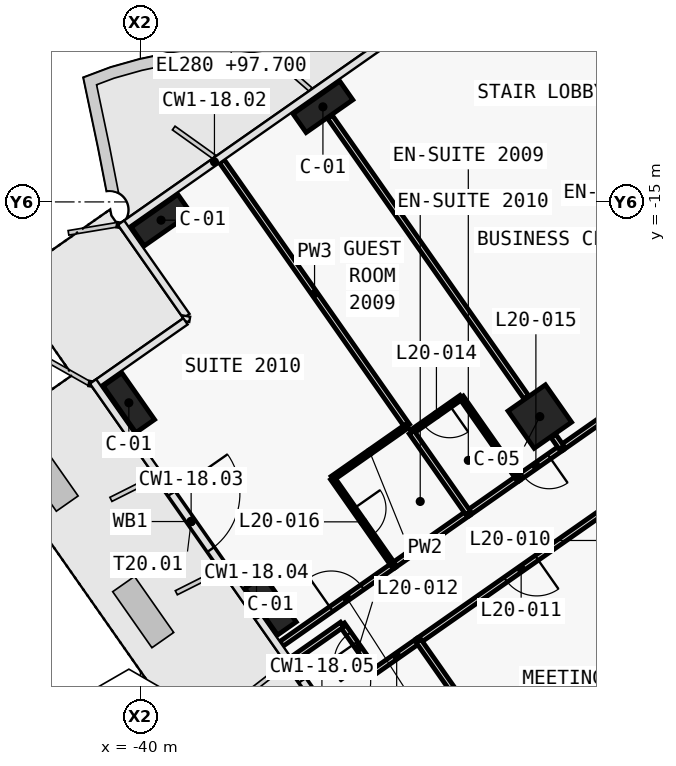
"""IFC4 building model, lengths in metres.
Left out: names, types, materials, properties, quantities, classifications, styles, units other than length and angle.
Written with IfcOpenShell. Run it as: python <this file> out.ifc"""

import sys

from ifc_helpers import new_model, si_unit, direction, frame, frame_2d, origin, origin_2d, place, context, subcontext, project, spatial, rectangle, extrude, element, fill, save


model = new_model("IFC4")
c1 = context("Model", 3, precision=1e-05, world=origin(), true_north=direction((0.0, 1.0)))
c2 = subcontext(c1, "Body", "Model", "MODEL_VIEW")
j1 = project(units=[si_unit("LENGTHUNIT", "METRE"), si_unit("PLANEANGLEUNIT", "RADIAN")], contexts=[c1])
p1 = place(None, origin())
s1 = spatial("IfcSite", under=j1, at=p1, CompositionType="ELEMENT")
p2 = place(p1, origin())
s2 = spatial("IfcBuilding", under=s1, at=p2, CompositionType="ELEMENT")
p3 = place(p2, frame((0.0, 0.0, 97.7)))
s3 = spatial("IfcBuildingStorey", under=s2, at=p3, CompositionType="ELEMENT", Elevation=97.7)
for number, where, z_axis, x_axis in (
    (1, (-35.197, -12.498, 0.0), (0.0, 0.0, 1.0), (-0.819, -0.574, 0.0)),
    (2, (-39.456, -15.481, 0.0), (0.0, 0.0, 1.0), (-0.819, -0.574, 0.0)),
    (3, (-36.575, -25.61, 0.0), (0.0, 0.0, 1.0), (-0.574, 0.819, 0.0)),
    (4, (-40.303, -20.286, 0.0), (0.0, 0.0, 1.0), (-0.574, 0.819, 0.0)),
):
    element("IfcColumn", number, at=place(p3, frame(where, z_axis=z_axis, x_axis=x_axis)), inside=s3, PredefinedType="COLUMN", context=c2, shape_type="SweptSolid", body=[
        extrude(rectangle(XDim=1.5, YDim=0.6, at=origin_2d()), origin(), (0.0, 0.0, 1.0), 3.6),
    ])
p4 = place(p3, frame((-29.49, -20.649, 0.0), z_axis=(0.0, 0.0, 1.0), x_axis=(-0.819152044289, -0.573576436351, 0.0)))
e5 = element("IfcColumn", 5, at=p4, inside=s3, PredefinedType="COLUMN", context=c2, shape_type="SweptSolid", body=[
    extrude(rectangle(XDim=1.2, YDim=1.2, at=origin_2d()), origin(), (0.0, 0.0, 1.0), 3.6),
])
p5 = place(p3, frame((-39.508, -22.207, 0.0), z_axis=(0.0, 0.0, 1.0), x_axis=(0.573584953252, -0.819146080625, 0.0)))
e6 = element("IfcWall", 6, at=p5, inside=s3, PredefinedType="SOLIDWALL", context=c2, shape_type="SweptSolid", body=[
    extrude(rectangle(XDim=2.94, YDim=0.2, at=frame_2d((1.47, 0.0))), origin(), (0.0, 0.0, 1.0), 3.32),
])
p6 = place(p5, frame((0.57, 0.0, 0.0)))
e7 = element("IfcOpeningElement", 7, at=p6, cuts=e6, PredefinedType="OPENING", context=c2, shape_type="SweptSolid", body=[
    extrude(rectangle(XDim=1.8, YDim=2.4, at=frame_2d((0.9, 1.2))), frame((0.0, 0.11, 0.0), z_axis=(0.0, -1.0, 0.0), x_axis=(1.0, 0.0, 0.0)), (0.0, 0.0, 1.0), 0.22),
])
p7 = place(p3, frame((-36.066, -27.122, 0.0), z_axis=(0.0, 0.0, 1.0), x_axis=(0.573584953252, -0.819146080625, 0.0)))
e8 = element("IfcWall", 8, at=p7, inside=s3, PredefinedType="SOLIDWALL", context=c2, shape_type="SweptSolid", body=[
    extrude(rectangle(XDim=2.94, YDim=0.2, at=frame_2d((1.47, 0.0))), origin(), (0.0, 0.0, 1.0), 3.32),
])
p8 = place(p7, frame((0.57, 0.0, 0.0)))
e9 = element("IfcOpeningElement", 9, at=p8, cuts=e8, PredefinedType="OPENING", context=c2, shape_type="SweptSolid", body=[
    extrude(rectangle(XDim=1.8, YDim=2.4, at=frame_2d((0.9, 1.2))), frame((0.0, 0.11, 0.0), z_axis=(0.0, -1.0, 0.0), x_axis=(1.0, 0.0, 0.0)), (0.0, 0.0, 1.0), 0.22),
])
p9 = place(p3, frame((-28.917, -21.469, 0.0), z_axis=(0.0, 0.0, 1.0), x_axis=(0.819152599934, 0.573575642807, 0.0)))
e10 = element("IfcWall", 10, at=p9, inside=s3, PredefinedType="PARTITIONING", context=c2, shape_type="SweptSolid", body=[
    extrude(rectangle(XDim=8.098, YDim=0.15, at=frame_2d((4.049, 0.0))), origin(), (0.0, 0.0, 1.0), 2.6),
])
p10 = place(p9, frame((3.599, 0.0, 0.0)))
e11 = element("IfcOpeningElement", 11, at=p10, cuts=e10, PredefinedType="OPENING", context=c2, shape_type="SweptSolid", body=[
    extrude(rectangle(XDim=0.9, YDim=2.1, at=frame_2d((0.45, 1.05))), frame((0.0, 0.085, 0.0), z_axis=(0.0, -1.0, 0.0), x_axis=(1.0, 0.0, 0.0)), (0.0, 0.0, 1.0), 0.17),
])
p11 = place(p3, frame((-28.914, -21.467, 0.0), z_axis=(0.0, 0.0, 1.0), x_axis=(-0.81914197737, -0.573590813132, 0.0)))
e12 = element("IfcWall", 12, at=p11, inside=s3, PredefinedType="PARTITIONING", context=c2, shape_type="SweptSolid", body=[
    extrude(rectangle(XDim=1.403, YDim=0.15, at=frame_2d((0.701, 0.0))), origin(), (0.0, 0.0, 1.0), 2.6),
])
p12 = place(p11, frame((0.403, 0.0, 0.0)))
e13 = element("IfcOpeningElement", 13, at=p12, cuts=e12, PredefinedType="OPENING", context=c2, shape_type="SweptSolid", body=[
    extrude(rectangle(XDim=0.85, YDim=2.1, at=frame_2d((0.425, 1.05))), frame((0.0, 0.085, 0.0), z_axis=(0.0, -1.0, 0.0), x_axis=(1.0, 0.0, 0.0)), (0.0, 0.0, 1.0), 0.17),
])
p13 = place(p3, frame((-31.375, -23.19, 0.0), z_axis=(0.0, 0.0, 1.0), x_axis=(0.819189013667, 0.573523634986, 0.0)))
e14 = element("IfcWall", 14, at=p13, inside=s3, PredefinedType="PARTITIONING", context=c2, shape_type="SweptSolid", body=[
    extrude(rectangle(XDim=1.604, YDim=0.15, at=frame_2d((0.802, 0.0))), origin(), (0.0, 0.0, 1.0), 3.32),
])
p14 = place(p3, frame((-36.288, -26.63, 0.0), z_axis=(0.0, 0.0, 1.0), x_axis=(0.819171400631, 0.573548791636, 0.0)))
e15 = element("IfcWall", 15, at=p14, inside=s3, PredefinedType="PARTITIONING", context=c2, shape_type="SweptSolid", body=[
    extrude(rectangle(XDim=3.601, YDim=0.15, at=frame_2d((1.801, 0.0))), origin(), (0.0, 0.0, 1.0), 2.5),
])
p15 = place(p14, frame((1.6, 0.0, 0.0)))
e16 = element("IfcOpeningElement", 16, at=p15, cuts=e15, PredefinedType="OPENING", context=c2, shape_type="SweptSolid", body=[
    extrude(rectangle(XDim=1.0, YDim=2.1, at=frame_2d((0.5, 1.05))), frame((0.0, 0.085, 0.0), z_axis=(0.0, -1.0, 0.0), x_axis=(1.0, 0.0, 0.0)), (0.0, 0.0, 1.0), 0.17),
])
p16 = place(p3, frame((-33.341, -24.566, 0.0), z_axis=(0.0, 0.0, 1.0), x_axis=(0.819179439794, 0.573537309527, 0.0)))
e17 = element("IfcWall", 17, at=p16, inside=s3, PredefinedType="PARTITIONING", context=c2, shape_type="SweptSolid", body=[
    extrude(rectangle(XDim=2.404, YDim=0.15, at=frame_2d((1.202, 0.0))), origin(), (0.0, 0.0, 1.0), 3.32),
])
p17 = place(p3, frame((-27.276, -22.761, 0.0), z_axis=(0.0, 0.0, 1.0), x_axis=(-0.819153746897, -0.573574004767, 0.0)))
e18 = element("IfcWall", 18, at=p17, inside=s3, PredefinedType="PARTITIONING", context=c2, shape_type="SweptSolid", body=[
    extrude(rectangle(XDim=6.603, YDim=0.15, at=frame_2d((3.302, 0.0))), origin(), (0.0, 0.0, 1.0), 2.6),
])
p18 = place(p17, frame((2.801, 0.0, 0.0)))
e19 = element("IfcOpeningElement", 19, at=p18, cuts=e18, PredefinedType="OPENING", context=c2, shape_type="SweptSolid", body=[
    extrude(rectangle(XDim=1.0, YDim=2.1, at=frame_2d((0.5, 1.05))), frame((0.0, 0.085, 0.0), z_axis=(0.0, -1.0, 0.0), x_axis=(1.0, 0.0, 0.0)), (0.0, 0.0, 1.0), 0.17),
])
p19 = place(p3, frame((-33.83, -27.351, 0.0), z_axis=(0.0, 0.0, 1.0), x_axis=(-0.573669850876, 0.819086626796, 0.0)))
e20 = element("IfcWall", 20, at=p19, inside=s3, PredefinedType="PARTITIONING", context=c2, shape_type="SweptSolid", body=[
    extrude(rectangle(XDim=1.5, YDim=0.15, at=frame_2d((0.75, 0.0))), origin(), (0.0, 0.0, 1.0), 3.32),
])
p20 = place(p19, frame((0.3, 0.0, 0.0)))
e21 = element("IfcOpeningElement", 21, at=p20, cuts=e20, PredefinedType="OPENING", context=c2, shape_type="SweptSolid", body=[
    extrude(rectangle(XDim=0.9, YDim=2.1, at=frame_2d((0.45, 1.05))), frame((0.0, 0.085, 0.0), z_axis=(0.0, -1.0, 0.0), x_axis=(1.0, 0.0, 0.0)), (0.0, 0.0, 1.0), 0.17),
])
p21 = place(p3, frame((-34.691, -26.122, 0.0), z_axis=(0.0, 0.0, 1.0), x_axis=(-0.819059844958, -0.573708088123, 0.0)))
e22 = element("IfcWall", 22, at=p21, inside=s3, PredefinedType="PARTITIONING", context=c2, shape_type="SweptSolid", body=[
    extrude(rectangle(XDim=1.6, YDim=0.15, at=frame_2d((0.8, 0.0))), origin(), (0.0, 0.0, 1.0), 2.5),
])
p22 = place(p3, frame((-32.682, -26.546, 0.0), z_axis=(0.0, 0.0, 1.0), x_axis=(-0.819133738125, -0.573602579375, 0.0)))
e23 = element("IfcWall", 23, at=p22, inside=s3, PredefinedType="PARTITIONING", context=c2, shape_type="SweptSolid", body=[
    extrude(rectangle(XDim=1.402, YDim=0.15, at=frame_2d((0.701, 0.0))), origin(), (0.0, 0.0, 1.0), 3.32),
])
p23 = place(p3, frame((-26.746, -12.014, 0.0), z_axis=(0.0, 0.0, 1.0), x_axis=(-0.573560650686, 0.819163097304, 0.0)))
e24 = element("IfcWall", 24, at=p23, inside=s3, PredefinedType="PARTITIONING", context=c2, shape_type="SweptSolid", body=[
    extrude(rectangle(XDim=3.0, YDim=0.15, at=frame_2d((1.5, 0.0))), origin(), (0.0, 0.0, 1.0), 3.32),
])
p24 = place(p3, frame((-28.916, -21.468, 0.0), z_axis=(0.0, 0.0, 1.0), x_axis=(-0.572944929411, 0.819593867633, 0.0)))
e25 = element("IfcWall", 25, at=p24, inside=s3, PredefinedType="PARTITIONING", context=c2, shape_type="SweptSolid", body=[
    extrude(rectangle(XDim=0.38, YDim=0.15, at=frame_2d((0.19, 0.0))), origin(), (0.0, 0.0, 1.0), 2.6),
])
p25 = place(p3, frame((-29.845, -20.141, 0.0), z_axis=(0.0, 0.0, 1.0), x_axis=(-0.573558725113, 0.819164445546, 0.0)))
e26 = element("IfcWall", 26, at=p25, inside=s3, PredefinedType="PARTITIONING", context=c2, shape_type="SweptSolid", body=[
    extrude(rectangle(XDim=9.01, YDim=0.15, at=frame_2d((4.505, 0.0))), origin(), (0.0, 0.0, 1.0), 2.6),
])
p26 = place(p3, frame((-30.062, -22.27, 0.0), z_axis=(0.0, 0.0, 1.0), x_axis=(-0.573537965655, 0.819178980414, 0.0)))
e27 = element("IfcWall", 27, at=p26, inside=s3, PredefinedType="PARTITIONING", context=c2, shape_type="SweptSolid", body=[
    extrude(rectangle(XDim=2.6, YDim=0.12, at=frame_2d((1.3, 0.0))), origin(), (0.0, 0.0, 1.0), 2.6),
])
p27 = place(p3, frame((-31.555, -20.14, 0.0), z_axis=(0.0, 0.0, 1.0), x_axis=(-0.819131543282, -0.57360571371, 0.0)))
e28 = element("IfcWall", 28, at=p27, inside=s3, PredefinedType="PARTITIONING", context=c2, shape_type="SweptSolid", body=[
    extrude(rectangle(XDim=1.6, YDim=0.12, at=frame_2d((0.8, 0.0))), origin(), (0.0, 0.0, 1.0), 3.32),
])
p28 = place(p27, frame((0.375, 0.0, 0.0)))
e29 = element("IfcOpeningElement", 29, at=p28, cuts=e28, PredefinedType="OPENING", context=c2, shape_type="SweptSolid", body=[
    extrude(rectangle(XDim=0.85, YDim=2.05, at=frame_2d((0.425, 1.025))), frame((0.0, 0.07, 0.0), z_axis=(0.0, -1.0, 0.0), x_axis=(1.0, 0.0, 0.0)), (0.0, 0.0, 1.0), 0.14),
])
p29 = place(p3, frame((-32.979, -20.896, 0.0), z_axis=(0.0, 0.0, 1.0), x_axis=(-0.573576058406, 0.819152308929, 0.0)))
e30 = element("IfcWall", 30, at=p29, inside=s3, PredefinedType="PARTITIONING", context=c2, shape_type="SweptSolid", body=[
    extrude(rectangle(XDim=8.501, YDim=0.15, at=frame_2d((4.25, 0.0))), origin(), (0.0, 0.0, 1.0), 2.5),
])
p30 = place(p3, frame((-31.373, -23.189, 0.0), z_axis=(0.0, 0.0, 1.0), x_axis=(-0.573600972199, 0.819134863556, 0.0)))
e31 = element("IfcWall", 31, at=p30, inside=s3, PredefinedType="PARTITIONING", context=c2, shape_type="SweptSolid", body=[
    extrude(rectangle(XDim=2.6, YDim=0.15, at=frame_2d((1.3, 0.0))), origin(), (0.0, 0.0, 1.0), 2.6),
])
p31 = place(p3, frame((-32.98, -20.894, 0.0), z_axis=(0.0, 0.0, 1.0), x_axis=(-0.819155442668, -0.573571582932, 0.0)))
e32 = element("IfcWall", 32, at=p31, inside=s3, PredefinedType="PARTITIONING", context=c2, shape_type="SweptSolid", body=[
    extrude(rectangle(XDim=2.4, YDim=0.12, at=frame_2d((1.2, 0.0))), origin(), (0.0, 0.0, 1.0), 3.32),
])
p32 = place(p3, frame((-34.946, -22.272, 0.0), z_axis=(0.0, 0.0, 1.0), x_axis=(0.573608623498, -0.819129505664, 0.0)))
e33 = element("IfcWall", 33, at=p32, inside=s3, PredefinedType="PARTITIONING", context=c2, shape_type="SweptSolid", body=[
    extrude(rectangle(XDim=2.8, YDim=0.12, at=frame_2d((1.4, 0.0))), origin(), (0.0, 0.0, 1.0), 2.6),
])
p33 = place(p32, frame((0.975, 0.0, 0.0)))
e34 = element("IfcOpeningElement", 34, at=p33, cuts=e33, PredefinedType="OPENING", context=c2, shape_type="SweptSolid", body=[
    extrude(rectangle(XDim=0.85, YDim=2.05, at=frame_2d((0.425, 1.025))), frame((0.0, 0.07, 0.0), z_axis=(0.0, -1.0, 0.0), x_axis=(1.0, 0.0, 0.0)), (0.0, 0.0, 1.0), 0.14),
])
p34 = place(p3, frame((-30.101, -30.236, 0.0), z_axis=(0.0, 0.0, 1.0), x_axis=(-0.573564243949, 0.819160581365, 0.0)))
e35 = element("IfcWall", 35, at=p34, inside=s3, PredefinedType="PARTITIONING", context=c2, shape_type="SweptSolid", body=[
    extrude(rectangle(XDim=4.502, YDim=0.15, at=frame_2d((2.251, 0.0))), origin(), (0.0, 0.0, 1.0), 3.32),
])
p35 = place(p6, origin())
e36 = element("IfcDoor", 36, at=p35, inside=s3, OperationType="DOUBLE_DOOR_DOUBLE_SWING", PredefinedType="DOOR", context=c2, shape_type="SweptSolid", body=[
    extrude(rectangle(XDim=1.8, YDim=2.4, at=frame_2d((0.9, 1.2))), frame((0.0, 0.025, 0.0), z_axis=(0.0, -1.0, 0.0), x_axis=(1.0, 0.0, 0.0)), (0.0, 0.0, 1.0), 0.05),
])
fill(e7, e36)
p36 = place(p8, origin())
e37 = element("IfcDoor", 37, at=p36, inside=s3, OperationType="DOUBLE_DOOR_DOUBLE_SWING", PredefinedType="DOOR", context=c2, shape_type="SweptSolid", body=[
    extrude(rectangle(XDim=1.8, YDim=2.4, at=frame_2d((0.9, 1.2))), frame((0.0, 0.025, 0.0), z_axis=(0.0, -1.0, 0.0), x_axis=(1.0, 0.0, 0.0)), (0.0, 0.0, 1.0), 0.05),
])
fill(e9, e37)
p37 = place(p18, origin())
e38 = element("IfcDoor", 38, at=p37, inside=s3, OperationType="SINGLE_SWING_RIGHT", PredefinedType="DOOR", context=c2, shape_type="SweptSolid", body=[
    extrude(rectangle(XDim=1.0, YDim=2.1, at=frame_2d((0.5, 1.05))), frame((0.0, 0.025, 0.0), z_axis=(0.0, -1.0, 0.0), x_axis=(1.0, 0.0, 0.0)), (0.0, 0.0, 1.0), 0.05),
])
fill(e19, e38)
p38 = place(p20, origin())
e39 = element("IfcDoor", 39, at=p38, inside=s3, OperationType="SINGLE_SWING_LEFT", PredefinedType="DOOR", context=c2, shape_type="SweptSolid", body=[
    extrude(rectangle(XDim=0.9, YDim=2.1, at=frame_2d((0.45, 1.05))), frame((0.0, 0.025, 0.0), z_axis=(0.0, -1.0, 0.0), x_axis=(1.0, 0.0, 0.0)), (0.0, 0.0, 1.0), 0.05),
])
fill(e21, e39)
p39 = place(p28, origin())
e40 = element("IfcDoor", 40, at=p39, inside=s3, OperationType="SINGLE_SWING_RIGHT", PredefinedType="DOOR", context=c2, shape_type="SweptSolid", body=[
    extrude(rectangle(XDim=0.85, YDim=2.05, at=frame_2d((0.425, 1.025))), frame((0.0, 0.025, 0.0), z_axis=(0.0, -1.0, 0.0), x_axis=(1.0, 0.0, 0.0)), (0.0, 0.0, 1.0), 0.05),
])
fill(e29, e40)
p40 = place(p12, origin())
e41 = element("IfcDoor", 41, at=p40, inside=s3, OperationType="SINGLE_SWING_LEFT", PredefinedType="DOOR", context=c2, shape_type="SweptSolid", body=[
    extrude(rectangle(XDim=0.85, YDim=2.1, at=frame_2d((0.425, 1.05))), frame((0.0, 0.025, 0.0), z_axis=(0.0, -1.0, 0.0), x_axis=(1.0, 0.0, 0.0)), (0.0, 0.0, 1.0), 0.05),
])
fill(e13, e41)
p41 = place(p33, origin())
e42 = element("IfcDoor", 42, at=p41, inside=s3, OperationType="SINGLE_SWING_RIGHT", PredefinedType="DOOR", context=c2, shape_type="SweptSolid", body=[
    extrude(rectangle(XDim=0.85, YDim=2.05, at=frame_2d((0.425, 1.025))), frame((0.0, 0.025, 0.0), z_axis=(0.0, -1.0, 0.0), x_axis=(1.0, 0.0, 0.0)), (0.0, 0.0, 1.0), 0.05),
])
fill(e34, e42)
p42 = place(p15, origin())
e43 = element("IfcDoor", 43, at=p42, inside=s3, OperationType="SINGLE_SWING_RIGHT", PredefinedType="DOOR", context=c2, shape_type="SweptSolid", body=[
    extrude(rectangle(XDim=1.0, YDim=2.1, at=frame_2d((0.5, 1.05))), frame((0.0, 0.025, 0.0), z_axis=(0.0, -1.0, 0.0), x_axis=(1.0, 0.0, 0.0)), (0.0, 0.0, 1.0), 0.05),
])
fill(e16, e43)
save(model, sys.argv[1])
